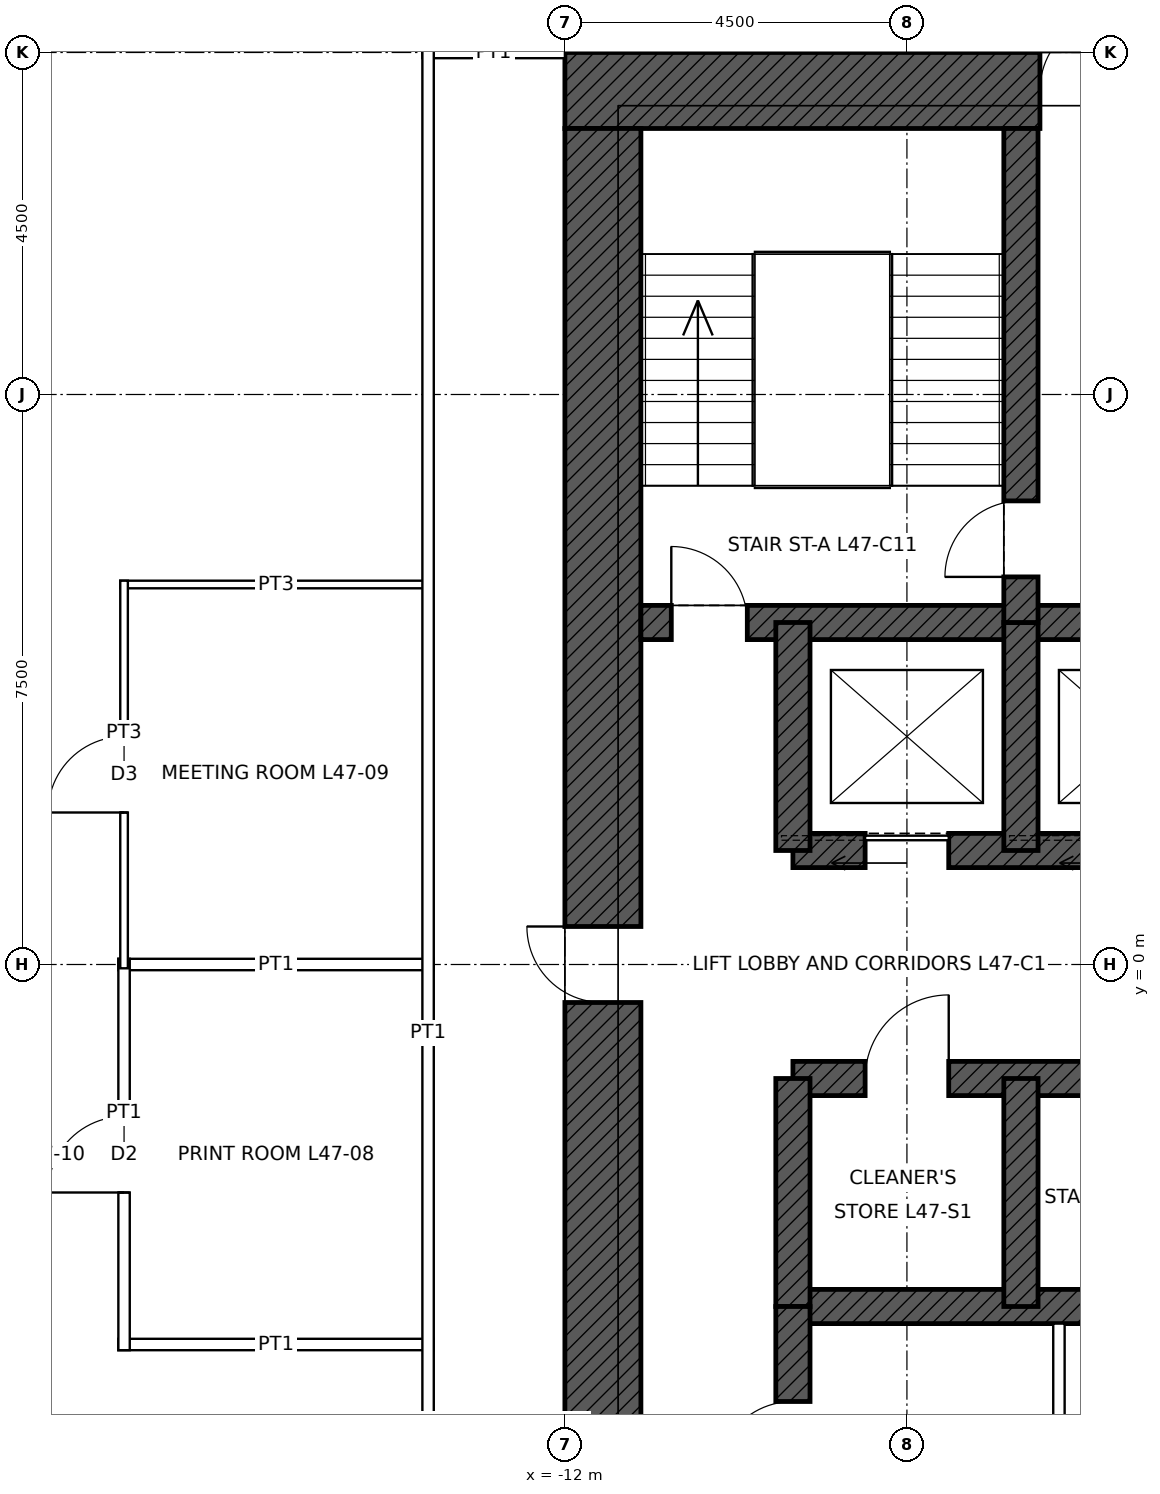
"""IFC4 building model, lengths in metres.
Left out: names, types, materials, properties, quantities, classifications, styles, units other than length and angle.
Written with IfcOpenShell. Run it as: python <this file> out.ifc"""

import sys

from ifc_helpers import new_model, si_unit, direction, frame, frame_2d, origin, place, context, subcontext, project, spatial, rectangle, extrude, element, fill, save


model = new_model("IFC4")
c1 = context("Model", 3, precision=1e-05, world=origin(), true_north=direction((0.0, 1.0)))
c2 = subcontext(c1, "Body", "Model", "MODEL_VIEW")
j1 = project(units=[si_unit("LENGTHUNIT", "METRE"), si_unit("PLANEANGLEUNIT", "RADIAN")], contexts=[c1])
p1 = place(None, origin())
s1 = spatial("IfcSite", under=j1, at=p1, CompositionType="ELEMENT")
p2 = place(p1, origin())
s2 = spatial("IfcBuilding", under=s1, at=p2, CompositionType="ELEMENT")
p3 = place(p2, frame((0.0, 0.0, 221.9)))
s3 = spatial("IfcBuildingStorey", under=s2, at=p3, CompositionType="ELEMENT", Elevation=221.9)
p4 = place(p3, frame((-12.0, 11.5, 0.0), z_axis=(0.0, 0.0, 1.0), x_axis=(1.0, 0.0, 0.0)))
e1 = element("IfcWall", 1, at=p4, inside=s3, PredefinedType="SHEAR", context=c2, shape_type="SweptSolid", body=[
    extrude(rectangle(XDim=24.0, YDim=1.0, at=frame_2d((12.0, 0.0))), origin(), (0.0, 0.0, 1.0), 4.0),
])
p5 = place(p4, frame((6.25, 0.0, 0.0)))
e2 = element("IfcOpeningElement", 2, at=p5, cuts=e1, PredefinedType="OPENING", context=c2, shape_type="SweptSolid", body=[
    extrude(rectangle(XDim=1.0, YDim=2.4, at=frame_2d((0.5, 1.2))), frame((0.0, 0.51, 0.0), z_axis=(0.0, -1.0, 0.0), x_axis=(1.0, 0.0, 0.0)), (0.0, 0.0, 1.0), 1.02),
])
p6 = place(p4, frame((16.75, 0.0, 0.0)))
e3 = element("IfcOpeningElement", 3, at=p6, cuts=e1, PredefinedType="OPENING", context=c2, shape_type="SweptSolid", body=[
    extrude(rectangle(XDim=1.0, YDim=2.4, at=frame_2d((0.5, 1.2))), frame((0.0, 0.51, 0.0), z_axis=(0.0, -1.0, 0.0), x_axis=(1.0, 0.0, 0.0)), (0.0, 0.0, 1.0), 1.02),
])
p7 = place(p3, frame((-11.5, -11.0, 0.0), z_axis=(0.0, 0.0, 1.0), x_axis=(0.0, 1.0, 0.0)))
e4 = element("IfcWall", 4, at=p7, inside=s3, PredefinedType="SHEAR", context=c2, shape_type="SweptSolid", body=[
    extrude(rectangle(XDim=22.0, YDim=1.0, at=frame_2d((11.0, 0.0))), origin(), (0.0, 0.0, 1.0), 4.0),
])
p8 = place(p7, frame((10.5, 0.0, 0.0)))
e5 = element("IfcOpeningElement", 5, at=p8, cuts=e4, PredefinedType="OPENING", context=c2, shape_type="SweptSolid", body=[
    extrude(rectangle(XDim=1.0, YDim=2.4, at=frame_2d((0.5, 1.2))), frame((0.0, 0.51, 0.0), z_axis=(0.0, -1.0, 0.0), x_axis=(1.0, 0.0, 0.0)), (0.0, 0.0, 1.0), 1.02),
])
p9 = place(p3, frame((-11.0, 4.5, 0.0), z_axis=(0.0, 0.0, 1.0), x_axis=(1.0, 0.0, 0.0)))
e6 = element("IfcWall", 6, at=p9, inside=s3, PredefinedType="SHEAR", context=c2, shape_type="SweptSolid", body=[
    extrude(rectangle(XDim=22.0, YDim=0.45, at=frame_2d((11.0, 0.0))), origin(), (0.0, 0.0, 1.0), 4.0),
])
p10 = place(p9, frame((0.4, 0.0, 0.0)))
e7 = element("IfcOpeningElement", 7, at=p10, cuts=e6, PredefinedType="OPENING", context=c2, shape_type="SweptSolid", body=[
    extrude(rectangle(XDim=1.0, YDim=2.1, at=frame_2d((0.5, 1.05))), frame((0.0, 0.235, 0.0), z_axis=(0.0, -1.0, 0.0), x_axis=(1.0, 0.0, 0.0)), (0.0, 0.0, 1.0), 0.47),
])
p11 = place(p9, frame((20.6, 0.0, 0.0)))
e8 = element("IfcOpeningElement", 8, at=p11, cuts=e6, PredefinedType="OPENING", context=c2, shape_type="SweptSolid", body=[
    extrude(rectangle(XDim=1.0, YDim=2.1, at=frame_2d((0.5, 1.05))), frame((0.0, 0.235, 0.0), z_axis=(0.0, -1.0, 0.0), x_axis=(1.0, 0.0, 0.0)), (0.0, 0.0, 1.0), 0.47),
])
p12 = place(p3, frame((-9.0, 1.5, 0.0), z_axis=(0.0, 0.0, 1.0), x_axis=(1.0, 0.0, 0.0)))
e9 = element("IfcWall", 9, at=p12, inside=s3, PredefinedType="SHEAR", context=c2, shape_type="SweptSolid", body=[
    extrude(rectangle(XDim=18.0, YDim=0.45, at=frame_2d((9.0, 0.0))), origin(), (0.0, 0.0, 1.0), 4.0),
])
p13 = place(p12, frame((0.95, 0.0, 0.0)))
e10 = element("IfcOpeningElement", 10, at=p13, cuts=e9, PredefinedType="OPENING", context=c2, shape_type="SweptSolid", body=[
    extrude(rectangle(XDim=1.1, YDim=2.1, at=frame_2d((0.55, 1.05))), frame((0.0, 0.235, 0.0), z_axis=(0.0, -1.0, 0.0), x_axis=(1.0, 0.0, 0.0)), (0.0, 0.0, 1.0), 0.47),
])
p14 = place(p12, frame((3.95, 0.0, 0.0)))
e11 = element("IfcOpeningElement", 11, at=p14, cuts=e9, PredefinedType="OPENING", context=c2, shape_type="SweptSolid", body=[
    extrude(rectangle(XDim=1.1, YDim=2.1, at=frame_2d((0.55, 1.05))), frame((0.0, 0.235, 0.0), z_axis=(0.0, -1.0, 0.0), x_axis=(1.0, 0.0, 0.0)), (0.0, 0.0, 1.0), 0.47),
])
p15 = place(p12, frame((6.95, 0.0, 0.0)))
e12 = element("IfcOpeningElement", 12, at=p15, cuts=e9, PredefinedType="OPENING", context=c2, shape_type="SweptSolid", body=[
    extrude(rectangle(XDim=1.1, YDim=2.1, at=frame_2d((0.55, 1.05))), frame((0.0, 0.235, 0.0), z_axis=(0.0, -1.0, 0.0), x_axis=(1.0, 0.0, 0.0)), (0.0, 0.0, 1.0), 0.47),
])
p16 = place(p12, frame((9.95, 0.0, 0.0)))
e13 = element("IfcOpeningElement", 13, at=p16, cuts=e9, PredefinedType="OPENING", context=c2, shape_type="SweptSolid", body=[
    extrude(rectangle(XDim=1.1, YDim=2.1, at=frame_2d((0.55, 1.05))), frame((0.0, 0.235, 0.0), z_axis=(0.0, -1.0, 0.0), x_axis=(1.0, 0.0, 0.0)), (0.0, 0.0, 1.0), 0.47),
])
p17 = place(p12, frame((12.95, 0.0, 0.0)))
e14 = element("IfcOpeningElement", 14, at=p17, cuts=e9, PredefinedType="OPENING", context=c2, shape_type="SweptSolid", body=[
    extrude(rectangle(XDim=1.1, YDim=2.1, at=frame_2d((0.55, 1.05))), frame((0.0, 0.235, 0.0), z_axis=(0.0, -1.0, 0.0), x_axis=(1.0, 0.0, 0.0)), (0.0, 0.0, 1.0), 0.47),
])
p18 = place(p12, frame((15.95, 0.0, 0.0)))
e15 = element("IfcOpeningElement", 15, at=p18, cuts=e9, PredefinedType="OPENING", context=c2, shape_type="SweptSolid", body=[
    extrude(rectangle(XDim=1.1, YDim=2.1, at=frame_2d((0.55, 1.05))), frame((0.0, 0.235, 0.0), z_axis=(0.0, -1.0, 0.0), x_axis=(1.0, 0.0, 0.0)), (0.0, 0.0, 1.0), 0.47),
])
p19 = place(p3, frame((-9.0, -1.5, 0.0), z_axis=(0.0, 0.0, 1.0), x_axis=(1.0, 0.0, 0.0)))
e16 = element("IfcWall", 16, at=p19, inside=s3, PredefinedType="SHEAR", context=c2, shape_type="SweptSolid", body=[
    extrude(rectangle(XDim=18.0, YDim=0.45, at=frame_2d((9.0, 0.0))), origin(), (0.0, 0.0, 1.0), 4.0),
])
p20 = place(p19, frame((0.95, 0.0, 0.0)))
e17 = element("IfcOpeningElement", 17, at=p20, cuts=e16, PredefinedType="OPENING", context=c2, shape_type="SweptSolid", body=[
    extrude(rectangle(XDim=1.1, YDim=2.1, at=frame_2d((0.55, 1.05))), frame((0.0, 0.235, 0.0), z_axis=(0.0, -1.0, 0.0), x_axis=(1.0, 0.0, 0.0)), (0.0, 0.0, 1.0), 0.47),
])
p21 = place(p19, frame((3.95, 0.0, 0.0)))
e18 = element("IfcOpeningElement", 18, at=p21, cuts=e16, PredefinedType="OPENING", context=c2, shape_type="SweptSolid", body=[
    extrude(rectangle(XDim=1.1, YDim=2.1, at=frame_2d((0.55, 1.05))), frame((0.0, 0.235, 0.0), z_axis=(0.0, -1.0, 0.0), x_axis=(1.0, 0.0, 0.0)), (0.0, 0.0, 1.0), 0.47),
])
p22 = place(p19, frame((6.95, 0.0, 0.0)))
e19 = element("IfcOpeningElement", 19, at=p22, cuts=e16, PredefinedType="OPENING", context=c2, shape_type="SweptSolid", body=[
    extrude(rectangle(XDim=1.1, YDim=2.1, at=frame_2d((0.55, 1.05))), frame((0.0, 0.235, 0.0), z_axis=(0.0, -1.0, 0.0), x_axis=(1.0, 0.0, 0.0)), (0.0, 0.0, 1.0), 0.47),
])
p23 = place(p3, frame((-9.0, -4.5, 0.0), z_axis=(0.0, 0.0, 1.0), x_axis=(1.0, 0.0, 0.0)))
e20 = element("IfcWall", 20, at=p23, inside=s3, PredefinedType="SHEAR", context=c2, shape_type="SweptSolid", body=[
    extrude(rectangle(XDim=18.0, YDim=0.45, at=frame_2d((9.0, 0.0))), origin(), (0.0, 0.0, 1.0), 4.0),
])
for number, where, z_axis, x_axis in (
    (21, (-9.0, 1.5, 0.0), (0.0, 0.0, 1.0), (0.0, 1.0, 0.0)),
    (22, (-9.0, -4.5, 0.0), (0.0, 0.0, 1.0), (0.0, 1.0, 0.0)),
    (23, (-6.0, 1.5, 0.0), (0.0, 0.0, 1.0), (0.0, 1.0, 0.0)),
    (24, (-6.0, -4.5, 0.0), (0.0, 0.0, 1.0), (0.0, 1.0, 0.0)),
):
    element("IfcWall", number, at=place(p3, frame(where, z_axis=z_axis, x_axis=x_axis)), inside=s3, PredefinedType="SHEAR", context=c2, shape_type="SweptSolid", body=[
        extrude(rectangle(XDim=3.0, YDim=0.45, at=frame_2d((1.5, 0.0))), origin(), (0.0, 0.0, 1.0), 4.0),
    ])
p24 = place(p3, frame((-6.0, 4.5, 0.0), z_axis=(0.0, 0.0, 1.0), x_axis=(0.0, 1.0, 0.0)))
e25 = element("IfcWall", 25, at=p24, inside=s3, PredefinedType="SHEAR", context=c2, shape_type="SweptSolid", body=[
    extrude(rectangle(XDim=6.5, YDim=0.45, at=frame_2d((3.25, 0.0))), origin(), (0.0, 0.0, 1.0), 4.0),
])
p25 = place(p24, frame((0.6, 0.0, 0.0)))
e26 = element("IfcOpeningElement", 26, at=p25, cuts=e25, PredefinedType="OPENING", context=c2, shape_type="SweptSolid", body=[
    extrude(rectangle(XDim=1.0, YDim=2.1, at=frame_2d((0.5, 1.05))), frame((0.0, 0.235, 0.0), z_axis=(0.0, -1.0, 0.0), x_axis=(1.0, 0.0, 0.0)), (0.0, 0.0, 1.0), 0.47),
])
p26 = place(p3, frame((-9.0, -11.0, 0.0), z_axis=(0.0, 0.0, 1.0), x_axis=(0.0, 1.0, 0.0)))
e27 = element("IfcWall", 27, at=p26, inside=s3, PredefinedType="SHEAR", context=c2, shape_type="SweptSolid", body=[
    extrude(rectangle(XDim=6.5, YDim=0.45, at=frame_2d((3.25, 0.0))), origin(), (0.0, 0.0, 1.0), 4.0),
])
p27 = place(p26, frame((4.25, 0.0, 0.0)))
e28 = element("IfcOpeningElement", 28, at=p27, cuts=e27, PredefinedType="OPENING", context=c2, shape_type="SweptSolid", body=[
    extrude(rectangle(XDim=1.0, YDim=2.1, at=frame_2d((0.5, 1.05))), frame((0.0, 0.235, 0.0), z_axis=(0.0, -1.0, 0.0), x_axis=(1.0, 0.0, 0.0)), (0.0, 0.0, 1.0), 0.47),
])
p28 = place(p3, frame((-17.875, -5.0, 0.0), z_axis=(0.0, 0.0, 1.0), x_axis=(1.0, 0.0, 0.0)))
e29 = element("IfcWall", 29, at=p28, inside=s3, PredefinedType="PARTITIONING", context=c2, shape_type="SweptSolid", body=[
    extrude(rectangle(XDim=4.15, YDim=0.15, at=frame_2d((2.075, 0.0))), origin(), (0.0, 0.0, 1.0), 3.85),
])
p29 = place(p3, frame((-17.875, 0.0, 0.0), z_axis=(0.0, 0.0, 1.0), x_axis=(1.0, 0.0, 0.0)))
e30 = element("IfcWall", 30, at=p29, inside=s3, PredefinedType="PARTITIONING", context=c2, shape_type="SweptSolid", body=[
    extrude(rectangle(XDim=4.15, YDim=0.15, at=frame_2d((2.075, 0.0))), origin(), (0.0, 0.0, 1.0), 3.238),
])
p30 = place(p3, frame((-17.85, 5.0, 0.0), z_axis=(0.0, 0.0, 1.0), x_axis=(1.0, 0.0, 0.0)))
e31 = element("IfcWall", 31, at=p30, inside=s3, PredefinedType="PARTITIONING", context=c2, shape_type="SweptSolid", body=[
    extrude(rectangle(XDim=4.1, YDim=0.1, at=frame_2d((2.05, 0.0))), origin(), (0.0, 0.0, 1.0), 3.85),
])
p31 = place(p3, frame((-13.875, 12.0, 0.0), z_axis=(0.0, 0.0, 1.0), x_axis=(1.0, 0.0, 0.0)))
e32 = element("IfcWall", 32, at=p31, inside=s3, PredefinedType="PARTITIONING", context=c2, shape_type="SweptSolid", body=[
    extrude(rectangle(XDim=1.875, YDim=0.15, at=frame_2d((0.938, 0.0))), origin(), (0.0, 0.0, 1.0), 3.85),
])
p32 = place(p3, frame((-17.8, -5.075, 0.0), z_axis=(0.0, 0.0, 1.0), x_axis=(0.0, 1.0, 0.0)))
e33 = element("IfcWall", 33, at=p32, inside=s3, PredefinedType="PARTITIONING", context=c2, shape_type="SweptSolid", body=[
    extrude(rectangle(XDim=5.15, YDim=0.15, at=frame_2d((2.575, 0.0))), origin(), (0.0, 0.0, 1.0), 3.85),
])
p33 = place(p32, frame((2.075, 0.0, 0.0)))
e34 = element("IfcOpeningElement", 34, at=p33, cuts=e33, PredefinedType="OPENING", context=c2, shape_type="SweptSolid", body=[
    extrude(rectangle(XDim=1.0, YDim=2.1, at=frame_2d((0.5, 1.05))), frame((0.0, 0.085, 0.0), z_axis=(0.0, -1.0, 0.0), x_axis=(1.0, 0.0, 0.0)), (0.0, 0.0, 1.0), 0.17),
])
p34 = place(p3, frame((-17.8, -0.05, 0.0), z_axis=(0.0, 0.0, 1.0), x_axis=(0.0, 1.0, 0.0)))
e35 = element("IfcWall", 35, at=p34, inside=s3, PredefinedType="PARTITIONING", context=c2, shape_type="SweptSolid", body=[
    extrude(rectangle(XDim=5.1, YDim=0.1, at=frame_2d((2.55, 0.0))), origin(), (0.0, 0.0, 1.0), 3.85),
])
p35 = place(p34, frame((2.05, 0.0, 0.0)))
e36 = element("IfcOpeningElement", 36, at=p35, cuts=e35, PredefinedType="OPENING", context=c2, shape_type="SweptSolid", body=[
    extrude(rectangle(XDim=1.0, YDim=2.1, at=frame_2d((0.5, 1.05))), frame((0.0, 0.06, 0.0), z_axis=(0.0, -1.0, 0.0), x_axis=(1.0, 0.0, 0.0)), (0.0, 0.0, 1.0), 0.12),
])
p36 = place(p3, frame((-13.8, -13.875, 0.0), z_axis=(0.0, 0.0, 1.0), x_axis=(0.0, 1.0, 0.0)))
e37 = element("IfcWall", 37, at=p36, inside=s3, PredefinedType="PARTITIONING", context=c2, shape_type="SweptSolid", body=[
    extrude(rectangle(XDim=25.95, YDim=0.15, at=frame_2d((12.975, 0.0))), origin(), (0.0, 0.0, 1.0), 3.85),
])
p37 = place(p3, frame((-5.5, -11.0, 0.0), z_axis=(0.0, 0.0, 1.0), x_axis=(0.0, 1.0, 0.0)))
e38 = element("IfcWall", 38, at=p37, inside=s3, PredefinedType="PARTITIONING", context=c2, shape_type="SweptSolid", body=[
    extrude(rectangle(XDim=6.275, YDim=0.15, at=frame_2d((3.137, 0.0))), origin(), (0.0, 0.0, 1.0), 3.75),
])
p38 = place(p37, frame((2.637, 0.0, 0.0)))
e39 = element("IfcOpeningElement", 39, at=p38, cuts=e38, PredefinedType="OPENING", context=c2, shape_type="SweptSolid", body=[
    extrude(rectangle(XDim=1.0, YDim=2.1, at=frame_2d((0.5, 1.05))), frame((0.0, 0.085, 0.0), z_axis=(0.0, -1.0, 0.0), x_axis=(1.0, 0.0, 0.0)), (0.0, 0.0, 1.0), 0.17),
])
p39 = place(p10, origin())
e40 = element("IfcDoor", 40, at=p39, inside=s3, OperationType="SINGLE_SWING_LEFT", PredefinedType="DOOR", context=c2, shape_type="SweptSolid", body=[
    extrude(rectangle(XDim=1.0, YDim=2.1, at=frame_2d((0.5, 1.05))), frame((0.0, 0.025, 0.0), z_axis=(0.0, -1.0, 0.0), x_axis=(1.0, 0.0, 0.0)), (0.0, 0.0, 1.0), 0.05),
])
fill(e7, e40)
p40 = place(p25, origin())
e41 = element("IfcDoor", 41, at=p40, inside=s3, OperationType="SINGLE_SWING_LEFT", PredefinedType="DOOR", context=c2, shape_type="SweptSolid", body=[
    extrude(rectangle(XDim=1.0, YDim=2.1, at=frame_2d((0.5, 1.05))), frame((0.0, 0.025, 0.0), z_axis=(0.0, -1.0, 0.0), x_axis=(1.0, 0.0, 0.0)), (0.0, 0.0, 1.0), 0.05),
])
fill(e26, e41)
p41 = place(p5, origin())
e42 = element("IfcDoor", 42, at=p41, inside=s3, OperationType="SINGLE_SWING_RIGHT", PredefinedType="DOOR", context=c2, shape_type="SweptSolid", body=[
    extrude(rectangle(XDim=1.0, YDim=2.4, at=frame_2d((0.5, 1.2))), frame((0.0, 0.485, 0.0), z_axis=(0.0, -1.0, 0.0), x_axis=(1.0, 0.0, 0.0)), (0.0, 0.0, 1.0), 0.05),
])
fill(e2, e42)
p42 = place(p8, origin())
e43 = element("IfcDoor", 43, at=p42, inside=s3, OperationType="SINGLE_SWING_RIGHT", PredefinedType="DOOR", context=c2, shape_type="SweptSolid", body=[
    extrude(rectangle(XDim=1.0, YDim=2.4, at=frame_2d((0.5, 1.2))), frame((0.0, 0.485, 0.0), z_axis=(0.0, -1.0, 0.0), x_axis=(1.0, 0.0, 0.0)), (0.0, 0.0, 1.0), 0.05),
])
fill(e5, e43)
p43 = place(p27, origin())
e44 = element("IfcDoor", 44, at=p43, inside=s3, OperationType="SINGLE_SWING_LEFT", PredefinedType="DOOR", context=c2, shape_type="SweptSolid", body=[
    extrude(rectangle(XDim=1.0, YDim=2.1, at=frame_2d((0.5, 1.05))), frame((0.0, 0.025, 0.0), z_axis=(0.0, -1.0, 0.0), x_axis=(1.0, 0.0, 0.0)), (0.0, 0.0, 1.0), 0.05),
])
fill(e28, e44)
p44 = place(p13, origin())
e45 = element("IfcDoor", 45, at=p44, inside=s3, OperationType="SLIDING_TO_LEFT", PredefinedType="DOOR", context=c2, shape_type="SweptSolid", body=[
    extrude(rectangle(XDim=1.1, YDim=2.1, at=frame_2d((0.55, 1.05))), frame((0.0, 0.025, 0.0), z_axis=(0.0, -1.0, 0.0), x_axis=(1.0, 0.0, 0.0)), (0.0, 0.0, 1.0), 0.05),
])
fill(e10, e45)
p45 = place(p20, origin())
e46 = element("IfcDoor", 46, at=p45, inside=s3, OperationType="SINGLE_SWING_RIGHT", PredefinedType="DOOR", context=c2, shape_type="SweptSolid", body=[
    extrude(rectangle(XDim=1.1, YDim=2.1, at=frame_2d((0.55, 1.05))), frame((0.0, 0.025, 0.0), z_axis=(0.0, -1.0, 0.0), x_axis=(1.0, 0.0, 0.0)), (0.0, 0.0, 1.0), 0.05),
])
fill(e17, e46)
p46 = place(p33, origin())
e47 = element("IfcDoor", 47, at=p46, inside=s3, OperationType="SINGLE_SWING_LEFT", PredefinedType="DOOR", context=c2, shape_type="SweptSolid", body=[
    extrude(rectangle(XDim=1.0, YDim=2.1, at=frame_2d((0.5, 1.05))), frame((0.0, 0.025, 0.0), z_axis=(0.0, -1.0, 0.0), x_axis=(1.0, 0.0, 0.0)), (0.0, 0.0, 1.0), 0.05),
])
fill(e34, e47)
p47 = place(p35, origin())
e48 = element("IfcDoor", 48, at=p47, inside=s3, OperationType="SINGLE_SWING_LEFT", PredefinedType="DOOR", context=c2, shape_type="SweptSolid", body=[
    extrude(rectangle(XDim=1.0, YDim=2.1, at=frame_2d((0.5, 1.05))), frame((0.0, 0.025, 0.0), z_axis=(0.0, -1.0, 0.0), x_axis=(1.0, 0.0, 0.0)), (0.0, 0.0, 1.0), 0.05),
])
fill(e36, e48)
save(model, sys.argv[1])
